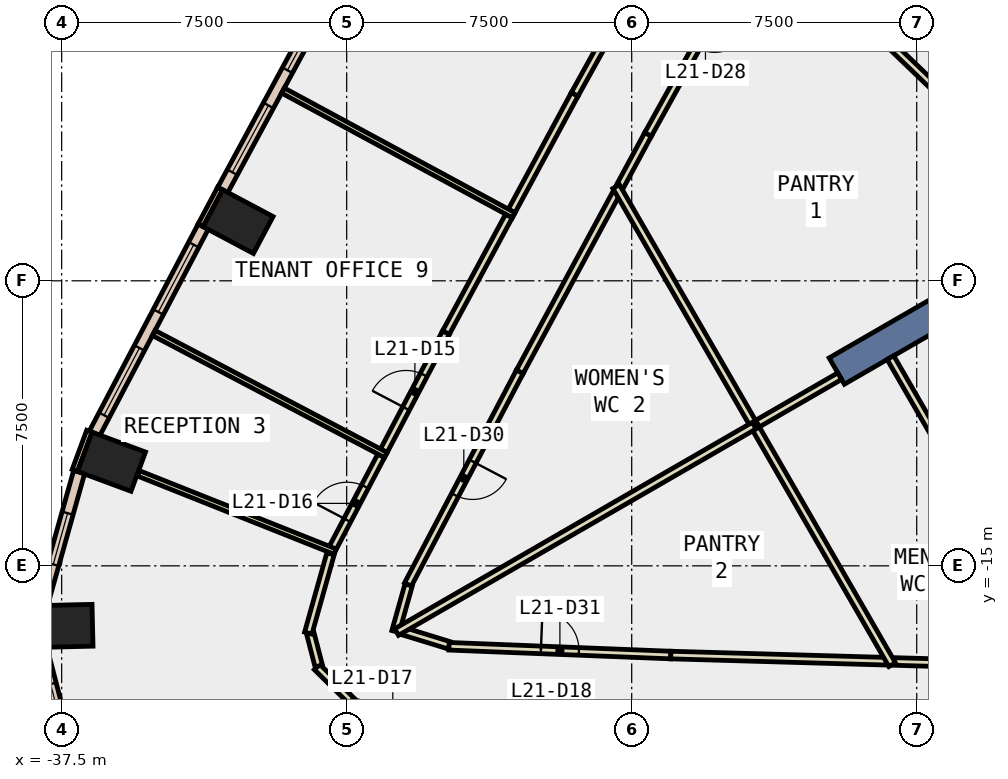
"""IFC4 building model, lengths in metres.
Left out: names, types, materials, properties, quantities, classifications, styles, units other than length and angle.
Written with IfcOpenShell. Run it as: python <this file> out.ifc"""

import sys

from ifc_helpers import new_model, si_unit, direction, frame, frame_2d, origin, origin_2d, place, context, subcontext, project, spatial, rectangle, extrude, element, fill, save


model = new_model("IFC4")
c1 = context("Model", 3, precision=1e-05, world=origin(), true_north=direction((0.0, 1.0)))
c2 = subcontext(c1, "Body", "Model", "MODEL_VIEW")
j1 = project(units=[si_unit("LENGTHUNIT", "METRE"), si_unit("PLANEANGLEUNIT", "RADIAN")], contexts=[c1])
p1 = place(None, origin())
s1 = spatial("IfcSite", under=j1, at=p1, CompositionType="ELEMENT")
p2 = place(p1, origin())
s2 = spatial("IfcBuilding", under=s1, at=p2, CompositionType="ELEMENT")
p3 = place(p2, frame((0.0, 0.0, 99.2)))
s3 = spatial("IfcBuildingStorey", under=s2, at=p3, CompositionType="ELEMENT", Elevation=99.2)
for number, where, z_axis, x_axis in (
    (1, (-32.858, -5.943, -0.4), (0.0, 0.0, 1.0), (0.469, 0.883, 0.0)),
    (2, (-36.188, -12.261, -0.4), (0.0, 0.0, 1.0), (0.347, 0.938, 0.0)),
    (3, (-37.438, -16.581, -0.4), (0.0, 0.0, 1.0), (-0.023, 1.0, 0.0)),
):
    element("IfcColumn", number, at=place(p3, frame(where, z_axis=z_axis, x_axis=x_axis)), inside=s3, PredefinedType="COLUMN", context=c2, shape_type="SweptSolid", body=[
        extrude(rectangle(XDim=1.1, YDim=1.5, at=origin_2d()), origin(), (0.0, 0.0, 1.0), 4.2),
    ])
p4 = place(p3, frame((-9.31, -5.375, -0.4), z_axis=(0.0, 0.0, 1.0), x_axis=(-0.866017533419, -0.500013631625, 0.0)))
e4 = element("IfcWall", 4, at=p4, inside=s3, PredefinedType="SHEAR", context=c2, shape_type="SweptSolid", body=[
    extrude(rectangle(XDim=9.0, YDim=0.8, at=frame_2d((4.5, 0.0))), origin(), (0.0, 0.0, 1.0), 4.2),
])
p5 = place(p3, frame((-33.329, -5.071, 0.0), z_axis=(0.0, 0.0, 1.0), x_axis=(-0.46919310775, -0.883095593716, 0.0)))
e5 = element("IfcWall", 5, at=p5, inside=s3, PredefinedType="STANDARD", context=c2, shape_type="SweptSolid", body=[
    extrude(rectangle(XDim=1.099, YDim=0.15, at=frame_2d((0.55, 0.0))), origin(), (0.0, 0.0, 1.0), 3.8),
])
p6 = place(p3, frame((-36.771, -11.458, 0.0), z_axis=(0.0, 0.0, 1.0), x_axis=(-0.347205967468, -0.937788897436, 0.0)))
e6 = element("IfcWall", 6, at=p6, inside=s3, PredefinedType="STANDARD", context=c2, shape_type="SweptSolid", body=[
    extrude(rectangle(XDim=1.1, YDim=0.15, at=frame_2d((0.55, 0.0))), origin(), (0.0, 0.0, 1.0), 3.8),
])
p7 = place(p3, frame((-30.357, 0.262, 0.0), z_axis=(0.0, 0.0, 1.0), x_axis=(-0.475573079782, -0.879676216449, 0.0)))
e7 = element("IfcWall", 7, at=p7, inside=s3, PredefinedType="STANDARD", context=c2, shape_type="SweptSolid", body=[
    extrude(rectangle(XDim=6.104, YDim=0.3, at=frame_2d((3.052, 0.0))), origin(), (0.0, 0.0, 1.0), 3.8),
])
p8 = place(p7, frame((0.526, 0.0, 0.9)))
e8 = element("IfcOpeningElement", 8, at=p8, cuts=e7, PredefinedType="OPENING", context=c2, shape_type="SweptSolid", body=[
    extrude(rectangle(XDim=2.0, YDim=2.6, at=frame_2d((1.0, 1.3))), frame((0.0, 0.16, 0.0), z_axis=(0.0, -1.0, 0.0), x_axis=(1.0, 0.0, 0.0)), (0.0, 0.0, 1.0), 0.32),
])
p9 = place(p7, frame((3.578, 0.0, 0.9)))
e9 = element("IfcOpeningElement", 9, at=p9, cuts=e7, PredefinedType="OPENING", context=c2, shape_type="SweptSolid", body=[
    extrude(rectangle(XDim=2.0, YDim=2.6, at=frame_2d((1.0, 1.3))), frame((0.0, 0.16, 0.0), z_axis=(0.0, -1.0, 0.0), x_axis=(1.0, 0.0, 0.0)), (0.0, 0.0, 1.0), 0.32),
])
p10 = place(p3, frame((-33.776, -6.077, 0.0), z_axis=(0.0, 0.0, 1.0), x_axis=(-0.465380908665, -0.88511050714, 0.0)))
e10 = element("IfcWall", 10, at=p10, inside=s3, PredefinedType="STANDARD", context=c2, shape_type="SweptSolid", body=[
    extrude(rectangle(XDim=6.139, YDim=0.3, at=frame_2d((3.07, 0.0))), origin(), (0.0, 0.0, 1.0), 3.8),
])
p11 = place(p10, frame((0.535, 0.0, 0.9)))
e11 = element("IfcOpeningElement", 11, at=p11, cuts=e10, PredefinedType="OPENING", context=c2, shape_type="SweptSolid", body=[
    extrude(rectangle(XDim=2.0, YDim=2.6, at=frame_2d((1.0, 1.3))), frame((0.0, 0.16, 0.0), z_axis=(0.0, -1.0, 0.0), x_axis=(1.0, 0.0, 0.0)), (0.0, 0.0, 1.0), 0.32),
])
p12 = place(p10, frame((3.604, 0.0, 0.9)))
e12 = element("IfcOpeningElement", 12, at=p12, cuts=e10, PredefinedType="OPENING", context=c2, shape_type="SweptSolid", body=[
    extrude(rectangle(XDim=2.0, YDim=2.6, at=frame_2d((1.0, 1.3))), frame((0.0, 0.16, 0.0), z_axis=(0.0, -1.0, 0.0), x_axis=(1.0, 0.0, 0.0)), (0.0, 0.0, 1.0), 0.32),
])
p13 = place(p3, frame((-37.04, -12.531, 0.0), z_axis=(0.0, 0.0, 1.0), x_axis=(-0.270054089595, -0.96284515302, 0.0)))
e13 = element("IfcWall", 13, at=p13, inside=s3, PredefinedType="STANDARD", context=c2, shape_type="SweptSolid", body=[
    extrude(rectangle(XDim=3.651, YDim=0.3, at=frame_2d((1.825, 0.0))), origin(), (0.0, 0.0, 1.0), 3.8),
])
p14 = place(p13, frame((1.125, 0.0, 0.9)))
e14 = element("IfcOpeningElement", 14, at=p14, cuts=e13, PredefinedType="OPENING", context=c2, shape_type="SweptSolid", body=[
    extrude(rectangle(XDim=1.4, YDim=2.6, at=frame_2d((0.7, 1.3))), frame((0.0, 0.16, 0.0), z_axis=(0.0, -1.0, 0.0), x_axis=(1.0, 0.0, 0.0)), (0.0, 0.0, 1.0), 0.32),
])
p15 = place(p3, frame((-38.042, -17.144, 0.0), z_axis=(0.0, 0.0, 1.0), x_axis=(0.251046938153, -0.967974914367, 0.0)))
e15 = element("IfcWall", 15, at=p15, inside=s3, PredefinedType="STANDARD", context=c2, shape_type="SweptSolid", body=[
    extrude(rectangle(XDim=3.398, YDim=0.3, at=frame_2d((1.699, 0.0))), origin(), (0.0, 0.0, 1.0), 3.8),
])
p16 = place(p15, frame((0.999, 0.0, 0.9)))
e16 = element("IfcOpeningElement", 16, at=p16, cuts=e15, PredefinedType="OPENING", context=c2, shape_type="SweptSolid", body=[
    extrude(rectangle(XDim=1.4, YDim=2.6, at=frame_2d((0.7, 1.3))), frame((0.0, 0.16, 0.0), z_axis=(0.0, -1.0, 0.0), x_axis=(1.0, 0.0, 0.0)), (0.0, 0.0, 1.0), 0.32),
])
p17 = place(p3, frame((-19.047, 1.799, 0.0), z_axis=(0.0, 0.0, 1.0), x_axis=(-0.485240396382, -0.87438078531, 0.0)))
e17 = element("IfcWall", 17, at=p17, inside=s3, PredefinedType="PARTITIONING", context=c2, shape_type="SweptSolid", body=[
    extrude(rectangle(XDim=6.232, YDim=0.2, at=frame_2d((3.116, 0.0))), origin(), (0.0, 0.0, 1.0), 3.8),
])
p18 = place(p17, frame((2.616, 0.0, 0.0)))
e18 = element("IfcOpeningElement", 18, at=p18, cuts=e17, PredefinedType="OPENING", context=c2, shape_type="SweptSolid", body=[
    extrude(rectangle(XDim=1.0, YDim=2.1, at=frame_2d((0.5, 1.05))), frame((0.0, 0.11, 0.0), z_axis=(0.0, -1.0, 0.0), x_axis=(1.0, 0.0, 0.0)), (0.0, 0.0, 1.0), 0.22),
])
p19 = place(p3, frame((-22.071, -3.65, 0.0), z_axis=(0.0, 0.0, 1.0), x_axis=(-0.475212034938, -0.879871309823, 0.0)))
e19 = element("IfcWall", 19, at=p19, inside=s3, PredefinedType="PARTITIONING", context=c2, shape_type="SweptSolid", body=[
    extrude(rectangle(XDim=1.557, YDim=0.2, at=frame_2d((0.779, 0.0))), origin(), (0.0, 0.0, 1.0), 3.8),
])
p20 = place(p3, frame((-15.596, -17.516, 0.0), z_axis=(0.0, 0.0, 1.0), x_axis=(0.99959813819, -0.028347171427, 0.0)))
e20 = element("IfcWall", 20, at=p20, inside=s3, PredefinedType="PARTITIONING", context=c2, shape_type="SweptSolid", body=[
    extrude(rectangle(XDim=1.016, YDim=0.2, at=frame_2d((0.508, 0.0))), origin(), (0.0, 0.0, 1.0), 3.8),
])
p21 = place(p3, frame((-22.906, -5.196, 0.0), z_axis=(0.0, 0.0, 1.0), x_axis=(-0.475448213767, -0.879743710421, 0.0)))
e21 = element("IfcWall", 21, at=p21, inside=s3, PredefinedType="PARTITIONING", context=c2, shape_type="SweptSolid", body=[
    extrude(rectangle(XDim=5.343, YDim=0.2, at=frame_2d((2.671, 0.0))), origin(), (0.0, 0.0, 1.0), 3.8),
])
p22 = place(p3, frame((-25.446, -9.896, 0.0), z_axis=(0.0, 0.0, 1.0), x_axis=(-0.465367816287, -0.885117390838, 0.0)))
e22 = element("IfcWall", 22, at=p22, inside=s3, PredefinedType="PARTITIONING", context=c2, shape_type="SweptSolid", body=[
    extrude(rectangle(XDim=6.326, YDim=0.2, at=frame_2d((3.163, 0.0))), origin(), (0.0, 0.0, 1.0), 3.8),
])
p23 = place(p22, frame((2.663, 0.0, 0.0)))
e23 = element("IfcOpeningElement", 23, at=p23, cuts=e22, PredefinedType="OPENING", context=c2, shape_type="SweptSolid", body=[
    extrude(rectangle(XDim=1.0, YDim=2.1, at=frame_2d((0.5, 1.05))), frame((0.0, 0.11, 0.0), z_axis=(0.0, -1.0, 0.0), x_axis=(1.0, 0.0, 0.0)), (0.0, 0.0, 1.0), 0.22),
])
p24 = place(p3, frame((-28.37, -15.503, 0.0), z_axis=(0.0, 0.0, 1.0), x_axis=(-0.270645732093, -0.962679015924, 0.0)))
e24 = element("IfcWall", 24, at=p24, inside=s3, PredefinedType="PARTITIONING", context=c2, shape_type="SweptSolid", body=[
    extrude(rectangle(XDim=1.275, YDim=0.2, at=frame_2d((0.637, 0.0))), origin(), (0.0, 0.0, 1.0), 3.8),
])
p25 = place(p3, frame((-28.503, -16.722, 0.0), z_axis=(0.0, 0.0, 1.0), x_axis=(0.95579582576, -0.294031187904, 0.0)))
e25 = element("IfcWall", 25, at=p25, inside=s3, PredefinedType="PARTITIONING", context=c2, shape_type="SweptSolid", body=[
    extrude(rectangle(XDim=1.255, YDim=0.2, at=frame_2d((0.628, 0.0))), origin(), (0.0, 0.0, 1.0), 3.8),
])
p26 = place(p3, frame((-27.307, -17.116, 0.0), z_axis=(0.0, 0.0, 1.0), x_axis=(0.999217829656, -0.039544012168, 0.0)))
e26 = element("IfcWall", 26, at=p26, inside=s3, PredefinedType="PARTITIONING", context=c2, shape_type="SweptSolid", body=[
    extrude(rectangle(XDim=5.841, YDim=0.2, at=frame_2d((2.92, 0.0))), origin(), (0.0, 0.0, 1.0), 3.8),
])
p27 = place(p26, frame((2.42, 0.0, 0.0)))
e27 = element("IfcOpeningElement", 27, at=p27, cuts=e26, PredefinedType="OPENING", context=c2, shape_type="SweptSolid", body=[
    extrude(rectangle(XDim=1.0, YDim=2.1, at=frame_2d((0.5, 1.05))), frame((0.0, 0.11, 0.0), z_axis=(0.0, -1.0, 0.0), x_axis=(1.0, 0.0, 0.0)), (0.0, 0.0, 1.0), 0.22),
])
p28 = place(p3, frame((-21.471, -17.347, 0.0), z_axis=(0.0, 0.0, 1.0), x_axis=(0.999587337564, -0.028725504044, 0.0)))
e28 = element("IfcWall", 28, at=p28, inside=s3, PredefinedType="PARTITIONING", context=c2, shape_type="SweptSolid", body=[
    extrude(rectangle(XDim=5.677, YDim=0.2, at=frame_2d((2.839, 0.0))), origin(), (0.0, 0.0, 1.0), 3.8),
])
p29 = place(p3, frame((-25.658, -5.661, 0.0), z_axis=(0.0, 0.0, 1.0), x_axis=(0.47543942367, 0.87974846088, 0.0)))
e29 = element("IfcWall", 29, at=p29, inside=s3, PredefinedType="PARTITIONING", context=c2, shape_type="SweptSolid", body=[
    extrude(rectangle(XDim=3.487, YDim=0.2, at=frame_2d((1.744, 0.0))), origin(), (0.0, 0.0, 1.0), 3.8),
])
p30 = place(p3, frame((-24.0, -2.593, 0.0), z_axis=(0.0, 0.0, 1.0), x_axis=(0.485148833338, 0.874431592242, 0.0)))
e30 = element("IfcWall", 30, at=p30, inside=s3, PredefinedType="PARTITIONING", context=c2, shape_type="SweptSolid", body=[
    extrude(rectangle(XDim=7.049, YDim=0.2, at=frame_2d((3.525, 0.0))), origin(), (0.0, 0.0, 1.0), 3.8),
])
p31 = place(p30, frame((3.099, 0.0, 0.0)))
e31 = element("IfcOpeningElement", 31, at=p31, cuts=e30, PredefinedType="OPENING", context=c2, shape_type="SweptSolid", body=[
    extrude(rectangle(XDim=1.0, YDim=2.1, at=frame_2d((0.5, 1.05))), frame((0.0, 0.11, 0.0), z_axis=(0.0, -1.0, 0.0), x_axis=(1.0, 0.0, 0.0)), (0.0, 0.0, 1.0), 0.22),
])
p32 = place(p3, frame((-29.023, -11.972, 0.0), z_axis=(0.0, 0.0, 1.0), x_axis=(0.465457263931, 0.885070356217, 0.0)))
e32 = element("IfcWall", 32, at=p32, inside=s3, PredefinedType="PARTITIONING", context=c2, shape_type="SweptSolid", body=[
    extrude(rectangle(XDim=3.515, YDim=0.2, at=frame_2d((1.757, 0.0))), origin(), (0.0, 0.0, 1.0), 3.8),
])
p33 = place(p32, frame((1.257, 0.0, 0.0)))
e33 = element("IfcOpeningElement", 33, at=p33, cuts=e32, PredefinedType="OPENING", context=c2, shape_type="SweptSolid", body=[
    extrude(rectangle(XDim=1.0, YDim=2.1, at=frame_2d((0.5, 1.05))), frame((0.0, 0.11, 0.0), z_axis=(0.0, -1.0, 0.0), x_axis=(1.0, 0.0, 0.0)), (0.0, 0.0, 1.0), 0.22),
])
p34 = place(p3, frame((-27.387, -8.861, 0.0), z_axis=(0.0, 0.0, 1.0), x_axis=(0.475193364801, 0.879881393171, 0.0)))
e34 = element("IfcWall", 34, at=p34, inside=s3, PredefinedType="PARTITIONING", context=c2, shape_type="SweptSolid", body=[
    extrude(rectangle(XDim=3.487, YDim=0.2, at=frame_2d((1.744, 0.0))), origin(), (0.0, 0.0, 1.0), 3.8),
])
p35 = place(p3, frame((-30.41, -14.61, 0.0), z_axis=(0.0, 0.0, 1.0), x_axis=(0.46516343569, 0.885224817827, 0.0)))
e35 = element("IfcWall", 35, at=p35, inside=s3, PredefinedType="PARTITIONING", context=c2, shape_type="SweptSolid", body=[
    extrude(rectangle(XDim=2.831, YDim=0.2, at=frame_2d((1.416, 0.0))), origin(), (0.0, 0.0, 1.0), 3.8),
])
p36 = place(p35, frame((0.916, 0.0, 0.0)))
e36 = element("IfcOpeningElement", 36, at=p36, cuts=e35, PredefinedType="OPENING", context=c2, shape_type="SweptSolid", body=[
    extrude(rectangle(XDim=1.0, YDim=2.1, at=frame_2d((0.5, 1.05))), frame((0.0, 0.11, 0.0), z_axis=(0.0, -1.0, 0.0), x_axis=(1.0, 0.0, 0.0)), (0.0, 0.0, 1.0), 0.22),
])
p37 = place(p3, frame((-27.676, -19.278, 0.0), z_axis=(0.0, 0.0, 1.0), x_axis=(-0.95581080774, 0.293982482143, 0.0)))
e37 = element("IfcWall", 37, at=p37, inside=s3, PredefinedType="PARTITIONING", context=c2, shape_type="SweptSolid", body=[
    extrude(rectangle(XDim=2.324, YDim=0.2, at=frame_2d((1.162, 0.0))), origin(), (0.0, 0.0, 1.0), 3.8),
])
p38 = place(p37, frame((0.662, 0.0, 0.0)))
e38 = element("IfcOpeningElement", 38, at=p38, cuts=e37, PredefinedType="OPENING", context=c2, shape_type="SweptSolid", body=[
    extrude(rectangle(XDim=1.0, YDim=2.1, at=frame_2d((0.5, 1.05))), frame((0.0, 0.11, 0.0), z_axis=(0.0, -1.0, 0.0), x_axis=(1.0, 0.0, 0.0)), (0.0, 0.0, 1.0), 0.22),
])
p39 = place(p3, frame((-29.873, -18.554, 0.0), z_axis=(0.0, 0.0, 1.0), x_axis=(-0.712546188185, 0.701625206006, 0.0)))
e39 = element("IfcWall", 39, at=p39, inside=s3, PredefinedType="PARTITIONING", context=c2, shape_type="SweptSolid", body=[
    extrude(rectangle(XDim=1.274, YDim=0.2, at=frame_2d((0.637, 0.0))), origin(), (0.0, 0.0, 1.0), 3.8),
])
p40 = place(p3, frame((-30.735, -17.634, 0.0), z_axis=(0.0, 0.0, 1.0), x_axis=(-0.251095196118, 0.967962397248, 0.0)))
e40 = element("IfcWall", 40, at=p40, inside=s3, PredefinedType="PARTITIONING", context=c2, shape_type="SweptSolid", body=[
    extrude(rectangle(XDim=0.892, YDim=0.2, at=frame_2d((0.446, 0.0))), origin(), (0.0, 0.0, 1.0), 3.8),
])
p41 = place(p3, frame((-31.011, -16.77, 0.0), z_axis=(0.0, 0.0, 1.0), x_axis=(0.270131711391, 0.962823378664, 0.0)))
e41 = element("IfcWall", 41, at=p41, inside=s3, PredefinedType="PARTITIONING", context=c2, shape_type="SweptSolid", body=[
    extrude(rectangle(XDim=2.166, YDim=0.2, at=frame_2d((1.083, 0.0))), origin(), (0.0, 0.0, 1.0), 3.8),
])
p42 = place(p3, frame((-13.847, -12.716, 0.0), z_axis=(0.0, 0.0, 1.0), x_axis=(-0.499861859587, 0.866105144501, 0.0)))
e42 = element("IfcWall", 42, at=p42, inside=s3, PredefinedType="PARTITIONING", context=c2, shape_type="SweptSolid", body=[
    extrude(rectangle(XDim=3.689, YDim=0.2, at=frame_2d((1.844, 0.0))), origin(), (0.0, 0.0, 1.0), 3.8),
])
p43 = place(p3, frame((-17.027, -10.009, 0.0), z_axis=(0.0, 0.0, 1.0), x_axis=(-0.865950948929, -0.500128937424, 0.0)))
e43 = element("IfcWall", 43, at=p43, inside=s3, PredefinedType="PARTITIONING", context=c2, shape_type="SweptSolid", body=[
    extrude(rectangle(XDim=2.599, YDim=0.2, at=frame_2d((1.3, 0.0))), origin(), (0.0, 0.0, 1.0), 3.8),
])
p44 = place(p3, frame((-19.278, -11.309, 0.0), z_axis=(0.0, 0.0, 1.0), x_axis=(-0.500044545065, 0.865999684151, 0.0)))
e44 = element("IfcWall", 44, at=p44, inside=s3, PredefinedType="PARTITIONING", context=c2, shape_type="SweptSolid", body=[
    extrude(rectangle(XDim=7.261, YDim=0.2, at=frame_2d((3.63, 0.0))), origin(), (0.0, 0.0, 1.0), 3.8),
])
p45 = place(p3, frame((-15.646, -17.6, 0.0), z_axis=(0.0, 0.0, 1.0), x_axis=(-0.499953299825, 0.866052364464, 0.0)))
e45 = element("IfcWall", 45, at=p45, inside=s3, PredefinedType="PARTITIONING", context=c2, shape_type="SweptSolid", body=[
    extrude(rectangle(XDim=7.263, YDim=0.2, at=frame_2d((3.631, 0.0))), origin(), (0.0, 0.0, 1.0), 3.8),
])
p46 = place(p3, frame((-19.277, -11.311, 0.0), z_axis=(0.0, 0.0, 1.0), x_axis=(-0.866078939042, -0.499907262747, 0.0)))
e46 = element("IfcWall", 46, at=p46, inside=s3, PredefinedType="PARTITIONING", context=c2, shape_type="SweptSolid", body=[
    extrude(rectangle(XDim=10.864, YDim=0.2, at=frame_2d((5.432, 0.0))), origin(), (0.0, 0.0, 1.0), 3.8),
])
p47 = place(p3, frame((-25.606, -5.775, 0.0), z_axis=(0.0, 0.0, 1.0), x_axis=(-0.87974530848, 0.475445256793, 0.0)))
e47 = element("IfcWall", 47, at=p47, inside=s3, PredefinedType="PARTITIONING", context=c2, shape_type="SweptSolid", body=[
    extrude(rectangle(XDim=6.901, YDim=0.15, at=frame_2d((3.45, 0.0))), origin(), (0.0, 0.0, 1.0), 3.8),
])
p48 = place(p3, frame((-28.969, -12.084, 0.0), z_axis=(0.0, 0.0, 1.0), x_axis=(-0.885142220222, 0.465320588391, 0.0)))
e48 = element("IfcWall", 48, at=p48, inside=s3, PredefinedType="PARTITIONING", context=c2, shape_type="SweptSolid", body=[
    extrude(rectangle(XDim=6.9, YDim=0.15, at=frame_2d((3.45, 0.0))), origin(), (0.0, 0.0, 1.0), 3.8),
])
p49 = place(p3, frame((-30.306, -14.625, 0.0), z_axis=(0.0, 0.0, 1.0), x_axis=(-0.929128339298, 0.369757392235, 0.0)))
e49 = element("IfcWall", 49, at=p49, inside=s3, PredefinedType="PARTITIONING", context=c2, shape_type="SweptSolid", body=[
    extrude(rectangle(XDim=5.569, YDim=0.15, at=frame_2d((2.784, 0.0))), origin(), (0.0, 0.0, 1.0), 3.8),
])
p50 = place(p3, frame((-10.96, -5.834, 0.0), z_axis=(0.0, 0.0, 1.0), x_axis=(-0.721236335428, 0.692689070549, 0.0)))
e50 = element("IfcWall", 50, at=p50, inside=s3, PredefinedType="PARTITIONING", context=c2, shape_type="SweptSolid", body=[
    extrude(rectangle(XDim=11.246, YDim=0.2, at=frame_2d((5.623, 0.0))), origin(), (0.0, 0.0, 1.0), 3.8),
])
p51 = place(p8, origin())
e51 = element("IfcWindow", 51, at=p51, inside=s3, PartitioningType="SINGLE_PANEL", PredefinedType="WINDOW", context=c2, shape_type="SweptSolid", body=[
    extrude(rectangle(XDim=2.0, YDim=2.6, at=frame_2d((1.0, 1.3))), frame((0.0, 0.03, 0.0), z_axis=(0.0, -1.0, 0.0), x_axis=(1.0, 0.0, 0.0)), (0.0, 0.0, 1.0), 0.06),
])
fill(e8, e51)
p52 = place(p9, origin())
e52 = element("IfcWindow", 52, at=p52, inside=s3, PartitioningType="SINGLE_PANEL", PredefinedType="WINDOW", context=c2, shape_type="SweptSolid", body=[
    extrude(rectangle(XDim=2.0, YDim=2.6, at=frame_2d((1.0, 1.3))), frame((0.0, 0.03, 0.0), z_axis=(0.0, -1.0, 0.0), x_axis=(1.0, 0.0, 0.0)), (0.0, 0.0, 1.0), 0.06),
])
fill(e9, e52)
p53 = place(p11, origin())
e53 = element("IfcWindow", 53, at=p53, inside=s3, PartitioningType="SINGLE_PANEL", PredefinedType="WINDOW", context=c2, shape_type="SweptSolid", body=[
    extrude(rectangle(XDim=2.0, YDim=2.6, at=frame_2d((1.0, 1.3))), frame((0.0, 0.03, 0.0), z_axis=(0.0, -1.0, 0.0), x_axis=(1.0, 0.0, 0.0)), (0.0, 0.0, 1.0), 0.06),
])
fill(e11, e53)
p54 = place(p12, origin())
e54 = element("IfcWindow", 54, at=p54, inside=s3, PartitioningType="SINGLE_PANEL", PredefinedType="WINDOW", context=c2, shape_type="SweptSolid", body=[
    extrude(rectangle(XDim=2.0, YDim=2.6, at=frame_2d((1.0, 1.3))), frame((0.0, 0.03, 0.0), z_axis=(0.0, -1.0, 0.0), x_axis=(1.0, 0.0, 0.0)), (0.0, 0.0, 1.0), 0.06),
])
fill(e12, e54)
p55 = place(p14, origin())
e55 = element("IfcWindow", 55, at=p55, inside=s3, PartitioningType="SINGLE_PANEL", PredefinedType="WINDOW", context=c2, shape_type="SweptSolid", body=[
    extrude(rectangle(XDim=1.4, YDim=2.6, at=frame_2d((0.7, 1.3))), frame((0.0, 0.03, 0.0), z_axis=(0.0, -1.0, 0.0), x_axis=(1.0, 0.0, 0.0)), (0.0, 0.0, 1.0), 0.06),
])
fill(e14, e55)
p56 = place(p16, origin())
e56 = element("IfcWindow", 56, at=p56, inside=s3, PartitioningType="SINGLE_PANEL", PredefinedType="WINDOW", context=c2, shape_type="SweptSolid", body=[
    extrude(rectangle(XDim=1.4, YDim=2.6, at=frame_2d((0.7, 1.3))), frame((0.0, 0.03, 0.0), z_axis=(0.0, -1.0, 0.0), x_axis=(1.0, 0.0, 0.0)), (0.0, 0.0, 1.0), 0.06),
])
fill(e16, e56)
p57 = place(p33, origin())
e57 = element("IfcDoor", 57, at=p57, inside=s3, OperationType="SINGLE_SWING_RIGHT", PredefinedType="DOOR", context=c2, shape_type="SweptSolid", body=[
    extrude(rectangle(XDim=1.0, YDim=2.1, at=frame_2d((0.5, 1.05))), frame((0.0, 0.025, 0.0), z_axis=(0.0, -1.0, 0.0), x_axis=(1.0, 0.0, 0.0)), (0.0, 0.0, 1.0), 0.05),
])
fill(e33, e57)
p58 = place(p36, origin())
e58 = element("IfcDoor", 58, at=p58, inside=s3, OperationType="SINGLE_SWING_LEFT", PredefinedType="DOOR", context=c2, shape_type="SweptSolid", body=[
    extrude(rectangle(XDim=1.0, YDim=2.1, at=frame_2d((0.5, 1.05))), frame((0.0, 0.025, 0.0), z_axis=(0.0, -1.0, 0.0), x_axis=(1.0, 0.0, 0.0)), (0.0, 0.0, 1.0), 0.05),
])
fill(e36, e58)
p59 = place(p23, origin())
e59 = element("IfcDoor", 59, at=p59, inside=s3, OperationType="SINGLE_SWING_LEFT", PredefinedType="DOOR", context=c2, shape_type="SweptSolid", body=[
    extrude(rectangle(XDim=1.0, YDim=2.1, at=frame_2d((0.5, 1.05))), frame((0.0, 0.025, 0.0), z_axis=(0.0, -1.0, 0.0), x_axis=(1.0, 0.0, 0.0)), (0.0, 0.0, 1.0), 0.05),
])
fill(e23, e59)
p60 = place(p27, origin())
e60 = element("IfcDoor", 60, at=p60, inside=s3, OperationType="SINGLE_SWING_LEFT", PredefinedType="DOOR", context=c2, shape_type="SweptSolid", body=[
    extrude(rectangle(XDim=1.0, YDim=2.1, at=frame_2d((0.5, 1.05))), frame((0.0, 0.025, 0.0), z_axis=(0.0, -1.0, 0.0), x_axis=(1.0, 0.0, 0.0)), (0.0, 0.0, 1.0), 0.05),
])
fill(e27, e60)
save(model, sys.argv[1])
